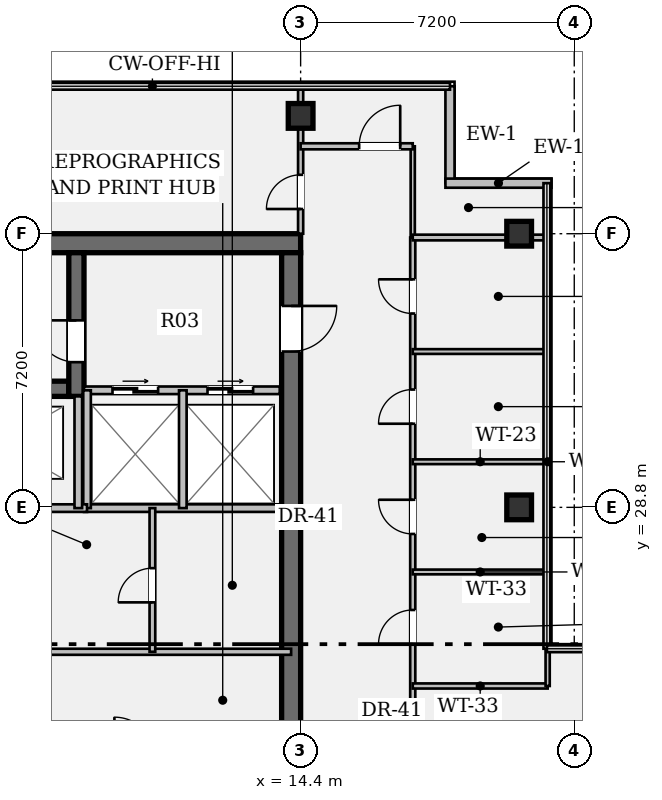
"""IFC4 building model, lengths in metres.
Left out: names, types, materials, properties, quantities, classifications, styles, units other than length and angle.
Written with IfcOpenShell. Run it as: python <this file> out.ifc"""

import sys

from ifc_helpers import new_model, si_unit, direction, frame, frame_2d, origin, origin_2d, place, context, subcontext, project, spatial, rectangle, hollow_rectangle, extrude, element, fill, save


model = new_model("IFC4")
c1 = context("Model", 3, precision=1e-05, world=origin(), true_north=direction((0.0, 1.0)))
c2 = subcontext(c1, "Body", "Model", "MODEL_VIEW")
j1 = project(units=[si_unit("LENGTHUNIT", "METRE"), si_unit("PLANEANGLEUNIT", "RADIAN")], contexts=[c1])
p1 = place(None, origin())
s1 = spatial("IfcSite", under=j1, at=p1, CompositionType="ELEMENT")
p2 = place(p1, origin())
s2 = spatial("IfcBuilding", under=s1, at=p2, CompositionType="ELEMENT")
p3 = place(p2, frame((0.0, 0.0, 251.65)))
s3 = spatial("IfcBuildingStorey", under=s2, at=p3, CompositionType="ELEMENT", Elevation=251.65)
p4 = place(p3, frame((0.5, 35.75, 0.0), z_axis=(0.0, 0.0, 1.0), x_axis=(1.0, 0.0, 0.0)))
e1 = element("IfcWall", 1, at=p4, inside=s3, PredefinedType="SHEAR", context=c2, shape_type="SweptSolid", body=[
    extrude(rectangle(XDim=13.9, YDim=0.5, at=frame_2d((6.95, 0.0))), origin(), (0.0, 0.0, 1.0), 3.24),
])
p5 = place(p3, frame((14.15, 35.5, 0.0), z_axis=(0.0, 0.0, 1.0), x_axis=(0.0, -1.0, 0.0)))
e2 = element("IfcWall", 2, at=p5, inside=s3, PredefinedType="SHEAR", context=c2, shape_type="SweptSolid", body=[
    extrude(rectangle(XDim=27.8, YDim=0.5, at=frame_2d((13.9, 0.0))), origin(), (0.0, 0.0, 1.0), 3.24),
])
p6 = place(p5, frame((1.4, 0.0, 0.0)))
e3 = element("IfcOpeningElement", 3, at=p6, cuts=e2, PredefinedType="OPENING", context=c2, shape_type="SweptSolid", body=[
    extrude(rectangle(XDim=1.2, YDim=2.15, at=frame_2d((0.6, 1.075))), frame((0.0, 0.262, 0.0), z_axis=(0.0, -1.0, 0.0), x_axis=(1.0, 0.0, 0.0)), (0.0, 0.0, 1.0), 0.524),
])
p7 = place(p5, frame((25.35, 0.0, 0.0)))
e4 = element("IfcOpeningElement", 4, at=p7, cuts=e2, PredefinedType="OPENING", context=c2, shape_type="SweptSolid", body=[
    extrude(rectangle(XDim=1.2, YDim=2.15, at=frame_2d((0.6, 1.075))), frame((0.0, 0.262, 0.0), z_axis=(0.0, -1.0, 0.0), x_axis=(1.0, 0.0, 0.0)), (0.0, 0.0, 1.0), 0.524),
])
p8 = place(p5, frame((14.7, 0.0, 0.0)))
e5 = element("IfcOpeningElement", 5, at=p8, cuts=e2, PredefinedType="OPENING", context=c2, shape_type="SweptSolid", body=[
    extrude(rectangle(XDim=1.6, YDim=2.2, at=frame_2d((0.8, 1.1))), frame((0.0, 0.262, 0.0), z_axis=(0.0, -1.0, 0.0), x_axis=(1.0, 0.0, 0.0)), (0.0, 0.0, 1.0), 0.524),
])
p9 = place(p3, frame((0.5, 31.92, 0.0), z_axis=(0.0, 0.0, 1.0), x_axis=(1.0, 0.0, 0.0)))
e6 = element("IfcWall", 6, at=p9, inside=s3, PredefinedType="SHEAR", context=c2, shape_type="SweptSolid", body=[
    extrude(rectangle(XDim=7.8, YDim=0.4, at=frame_2d((3.9, 0.0))), origin(), (0.0, 0.0, 1.0), 3.24),
])
p10 = place(p3, frame((8.5, 31.72, 0.0), z_axis=(0.0, 0.0, 1.0), x_axis=(0.0, 1.0, 0.0)))
e7 = element("IfcWall", 7, at=p10, inside=s3, PredefinedType="SHEAR", context=c2, shape_type="SweptSolid", body=[
    extrude(rectangle(XDim=3.78, YDim=0.4, at=frame_2d((1.89, 0.0))), origin(), (0.0, 0.0, 1.0), 3.24),
])
p11 = place(p10, frame((0.9, 0.0, 0.0)))
e8 = element("IfcOpeningElement", 8, at=p11, cuts=e7, PredefinedType="OPENING", context=c2, shape_type="SweptSolid", body=[
    extrude(rectangle(XDim=1.1, YDim=2.15, at=frame_2d((0.55, 1.075))), frame((0.0, 0.212, 0.0), z_axis=(0.0, -1.0, 0.0), x_axis=(1.0, 0.0, 0.0)), (0.0, 0.0, 1.0), 0.424),
])
for number, where, z_axis, x_axis in (
    (9, (14.4, 39.1, 0.0), (0.0, 0.0, 1.0), (1.0, 0.0, 0.0)),
    (10, (20.15, 28.8, 0.0), (0.0, 0.0, 1.0), (1.0, 0.0, 0.0)),
    (11, (20.15, 36.0, 0.0), (0.0, 0.0, 1.0), (1.0, 0.0, 0.0)),
):
    element("IfcColumn", number, at=place(p3, frame(where, z_axis=z_axis, x_axis=x_axis)), inside=s3, PredefinedType="COLUMN", context=c2, shape_type="SweptSolid", body=[
        extrude(hollow_rectangle(XDim=0.65, YDim=0.65, WallThickness=0.04, at=origin_2d()), origin(), (0.0, 0.0, 1.0), 3.24),
    ])
p12 = place(p3, frame((18.33, 39.88, 0.0), z_axis=(0.0, 0.0, 1.0), x_axis=(0.0, -1.0, 0.0)))
e12 = element("IfcWall", 12, at=p12, inside=s3, PredefinedType="STANDARD", context=c2, shape_type="SweptSolid", body=[
    extrude(rectangle(XDim=2.55, YDim=0.24, at=frame_2d((1.275, 0.0))), origin(), (0.0, 0.0, 1.0), 3.24),
])
p13 = place(p3, frame((18.21, 37.33, 0.0), z_axis=(0.0, 0.0, 1.0), x_axis=(1.0, 0.0, 0.0)))
e13 = element("IfcWall", 13, at=p13, inside=s3, PredefinedType="STANDARD", context=c2, shape_type="SweptSolid", body=[
    extrude(rectangle(XDim=2.79, YDim=0.24, at=frame_2d((1.395, 0.0))), origin(), (0.0, 0.0, 1.0), 3.24),
])
p14 = place(p3, frame((8.7, 31.88, 0.0), z_axis=(0.0, 0.0, 1.0), x_axis=(1.0, 0.0, 0.0)))
e14 = element("IfcWall", 14, at=p14, inside=s3, PredefinedType="PARTITIONING", context=c2, shape_type="SweptSolid", body=[
    extrude(rectangle(XDim=5.15, YDim=0.2, at=frame_2d((2.575, 0.0))), origin(), (0.0, 0.0, 1.0), 3.24),
])
p15 = place(p14, frame((0.75, 0.0, 0.0)))
e15 = element("IfcOpeningElement", 15, at=p15, cuts=e14, PredefinedType="OPENING", context=c2, shape_type="SweptSolid", body=[
    extrude(rectangle(XDim=1.2, YDim=2.2, at=frame_2d((0.6, 1.1))), frame((0.0, 0.112, 0.0), z_axis=(0.0, -1.0, 0.0), x_axis=(1.0, 0.0, 0.0)), (0.0, 0.0, 1.0), 0.224),
])
p16 = place(p14, frame((3.25, 0.0, 0.0)))
e16 = element("IfcOpeningElement", 16, at=p16, cuts=e14, PredefinedType="OPENING", context=c2, shape_type="SweptSolid", body=[
    extrude(rectangle(XDim=1.2, YDim=2.2, at=frame_2d((0.6, 1.1))), frame((0.0, 0.112, 0.0), z_axis=(0.0, -1.0, 0.0), x_axis=(1.0, 0.0, 0.0)), (0.0, 0.0, 1.0), 0.224),
])
p17 = place(p3, frame((8.7, 28.78, 0.0), z_axis=(0.0, 0.0, 1.0), x_axis=(1.0, 0.0, 0.0)))
e17 = element("IfcWall", 17, at=p17, inside=s3, PredefinedType="PARTITIONING", context=c2, shape_type="SweptSolid", body=[
    extrude(rectangle(XDim=5.15, YDim=0.2, at=frame_2d((2.575, 0.0))), origin(), (0.0, 0.0, 1.0), 3.24),
])
for number, where, z_axis, x_axis in (
    (18, (8.78, 28.78, 0.0), (0.0, 0.0, 1.0), (0.0, 1.0, 0.0)),
    (19, (11.3, 28.78, 0.0), (0.0, 0.0, 1.0), (0.0, 1.0, 0.0)),
):
    element("IfcWall", number, at=place(p3, frame(where, z_axis=z_axis, x_axis=x_axis)), inside=s3, PredefinedType="PARTITIONING", context=c2, shape_type="SweptSolid", body=[
        extrude(rectangle(XDim=3.1, YDim=0.2, at=frame_2d((1.55, 0.0))), origin(), (0.0, 0.0, 1.0), 3.24),
    ])
p18 = place(p3, frame((0.6, 28.78, 0.0), z_axis=(0.0, 0.0, 1.0), x_axis=(1.0, 0.0, 0.0)))
e20 = element("IfcWall", 20, at=p18, inside=s3, PredefinedType="PARTITIONING", context=c2, shape_type="SweptSolid", body=[
    extrude(rectangle(XDim=8.18, YDim=0.2, at=frame_2d((4.09, 0.0))), origin(), (0.0, 0.0, 1.0), 3.24),
])
p19 = place(p18, frame((1.21, 0.0, 0.0)))
e21 = element("IfcOpeningElement", 21, at=p19, cuts=e20, PredefinedType="OPENING", context=c2, shape_type="SweptSolid", body=[
    extrude(rectangle(XDim=0.95, YDim=2.15, at=frame_2d((0.475, 1.075))), frame((0.0, 0.112, 0.0), z_axis=(0.0, -1.0, 0.0), x_axis=(1.0, 0.0, 0.0)), (0.0, 0.0, 1.0), 0.224),
])
p20 = place(p18, frame((5.03, 0.0, 0.0)))
e22 = element("IfcOpeningElement", 22, at=p20, cuts=e20, PredefinedType="OPENING", context=c2, shape_type="SweptSolid", body=[
    extrude(rectangle(XDim=0.95, YDim=2.15, at=frame_2d((0.475, 1.075))), frame((0.0, 0.112, 0.0), z_axis=(0.0, -1.0, 0.0), x_axis=(1.0, 0.0, 0.0)), (0.0, 0.0, 1.0), 0.224),
])
p21 = place(p3, frame((8.55, 28.78, 0.0), z_axis=(0.0, 0.0, 1.0), x_axis=(0.0, 1.0, 0.0)))
e23 = element("IfcWall", 23, at=p21, inside=s3, PredefinedType="PARTITIONING", context=c2, shape_type="SweptSolid", body=[
    extrude(rectangle(XDim=2.94, YDim=0.2, at=frame_2d((1.47, 0.0))), origin(), (0.0, 0.0, 1.0), 3.24),
])
p22 = place(p3, frame((7.1, 25.0, 0.0), z_axis=(0.0, 0.0, 1.0), x_axis=(1.0, 0.0, 0.0)))
e24 = element("IfcWall", 24, at=p22, inside=s3, PredefinedType="PARTITIONING", context=c2, shape_type="SweptSolid", body=[
    extrude(rectangle(XDim=7.05, YDim=0.16, at=frame_2d((3.525, 0.0))), origin(), (0.0, 0.0, 1.0), 3.24),
])
p23 = place(p3, frame((10.5, 25.0, 0.0), z_axis=(0.0, 0.0, 1.0), x_axis=(0.0, 1.0, 0.0)))
e25 = element("IfcWall", 25, at=p23, inside=s3, PredefinedType="PARTITIONING", context=c2, shape_type="SweptSolid", body=[
    extrude(rectangle(XDim=3.78, YDim=0.15, at=frame_2d((1.89, 0.0))), origin(), (0.0, 0.0, 1.0), 3.24),
])
p24 = place(p23, frame((1.3, 0.0, 0.0)))
e26 = element("IfcOpeningElement", 26, at=p24, cuts=e25, PredefinedType="OPENING", context=c2, shape_type="SweptSolid", body=[
    extrude(rectangle(XDim=0.9, YDim=2.15, at=frame_2d((0.45, 1.075))), frame((0.0, 0.087, 0.0), z_axis=(0.0, -1.0, 0.0), x_axis=(1.0, 0.0, 0.0)), (0.0, 0.0, 1.0), 0.174),
])
p25 = place(p3, frame((17.35, 17.35, 0.0), z_axis=(0.0, 0.0, 1.0), x_axis=(0.0, 1.0, 0.0)))
e27 = element("IfcWall", 27, at=p25, inside=s3, PredefinedType="PARTITIONING", context=c2, shape_type="SweptSolid", body=[
    extrude(rectangle(XDim=18.55, YDim=0.135, at=frame_2d((9.275, 0.0))), origin(), (0.0, 0.0, 1.0), 2.676),
])
p26 = place(p25, frame((7.85, 0.0, 0.0)))
e28 = element("IfcOpeningElement", 28, at=p26, cuts=e27, PredefinedType="OPENING", context=c2, shape_type="SweptSolid", body=[
    extrude(rectangle(XDim=0.9, YDim=2.15, at=frame_2d((0.45, 1.075))), frame((0.0, 0.08, 0.0), z_axis=(0.0, -1.0, 0.0), x_axis=(1.0, 0.0, 0.0)), (0.0, 0.0, 1.0), 0.159),
])
p27 = place(p25, frame((10.75, 0.0, 0.0)))
e29 = element("IfcOpeningElement", 29, at=p27, cuts=e27, PredefinedType="OPENING", context=c2, shape_type="SweptSolid", body=[
    extrude(rectangle(XDim=0.9, YDim=2.15, at=frame_2d((0.45, 1.075))), frame((0.0, 0.08, 0.0), z_axis=(0.0, -1.0, 0.0), x_axis=(1.0, 0.0, 0.0)), (0.0, 0.0, 1.0), 0.159),
])
p28 = place(p25, frame((13.65, 0.0, 0.0)))
e30 = element("IfcOpeningElement", 30, at=p28, cuts=e27, PredefinedType="OPENING", context=c2, shape_type="SweptSolid", body=[
    extrude(rectangle(XDim=0.9, YDim=2.15, at=frame_2d((0.45, 1.075))), frame((0.0, 0.08, 0.0), z_axis=(0.0, -1.0, 0.0), x_axis=(1.0, 0.0, 0.0)), (0.0, 0.0, 1.0), 0.159),
])
p29 = place(p25, frame((16.55, 0.0, 0.0)))
e31 = element("IfcOpeningElement", 31, at=p29, cuts=e27, PredefinedType="OPENING", context=c2, shape_type="SweptSolid", body=[
    extrude(rectangle(XDim=0.9, YDim=2.15, at=frame_2d((0.45, 1.075))), frame((0.0, 0.08, 0.0), z_axis=(0.0, -1.0, 0.0), x_axis=(1.0, 0.0, 0.0)), (0.0, 0.0, 1.0), 0.159),
])
p30 = place(p3, frame((14.4, 36.0, 0.0), z_axis=(0.0, 0.0, 1.0), x_axis=(0.0, 1.0, 0.0)))
e32 = element("IfcWall", 32, at=p30, inside=s3, PredefinedType="PARTITIONING", context=c2, shape_type="SweptSolid", body=[
    extrude(rectangle(XDim=3.88, YDim=0.135, at=frame_2d((1.94, 0.0))), origin(), (0.0, 0.0, 1.0), 2.676),
])
p31 = place(p30, frame((0.65, 0.0, 0.0)))
e33 = element("IfcOpeningElement", 33, at=p31, cuts=e32, PredefinedType="OPENING", context=c2, shape_type="SweptSolid", body=[
    extrude(rectangle(XDim=0.9, YDim=2.15, at=frame_2d((0.45, 1.075))), frame((0.0, 0.08, 0.0), z_axis=(0.0, -1.0, 0.0), x_axis=(1.0, 0.0, 0.0)), (0.0, 0.0, 1.0), 0.159),
])
p32 = place(p3, frame((17.35, 35.9, 0.0), z_axis=(0.0, 0.0, 1.0), x_axis=(0.0, 1.0, 0.0)))
e34 = element("IfcWall", 34, at=p32, inside=s3, PredefinedType="PARTITIONING", context=c2, shape_type="SweptSolid", body=[
    extrude(rectangle(XDim=2.4, YDim=0.11, at=frame_2d((1.2, 0.0))), origin(), (0.0, 0.0, 1.0), 2.676),
])
p33 = place(p3, frame((14.4, 38.3, 0.0), z_axis=(0.0, 0.0, 1.0), x_axis=(1.0, 0.0, 0.0)))
e35 = element("IfcWall", 35, at=p33, inside=s3, PredefinedType="PARTITIONING", context=c2, shape_type="SweptSolid", body=[
    extrude(rectangle(XDim=2.95, YDim=0.16, at=frame_2d((1.475, 0.0))), origin(), (0.0, 0.0, 1.0), 3.24),
])
p34 = place(p33, frame((1.54, 0.0, 0.0)))
e36 = element("IfcOpeningElement", 36, at=p34, cuts=e35, PredefinedType="OPENING", context=c2, shape_type="SweptSolid", body=[
    extrude(rectangle(XDim=1.08, YDim=2.15, at=frame_2d((0.54, 1.075))), frame((0.0, 0.092, 0.0), z_axis=(0.0, -1.0, 0.0), x_axis=(1.0, 0.0, 0.0)), (0.0, 0.0, 1.0), 0.184),
])
p35 = place(p3, frame((17.35, 35.9, 0.0), z_axis=(0.0, 0.0, 1.0), x_axis=(1.0, 0.0, 0.0)))
e37 = element("IfcWall", 37, at=p35, inside=s3, PredefinedType="PARTITIONING", context=c2, shape_type="SweptSolid", body=[
    extrude(rectangle(XDim=3.53, YDim=0.15, at=frame_2d((1.765, 0.0))), origin(), (0.0, 0.0, 1.0), 2.676),
])
p36 = place(p3, frame((17.35, 24.1, 0.0), z_axis=(0.0, 0.0, 1.0), x_axis=(1.0, 0.0, 0.0)))
e38 = element("IfcWall", 38, at=p36, inside=s3, PredefinedType="PARTITIONING", context=c2, shape_type="SweptSolid", body=[
    extrude(rectangle(XDim=3.55, YDim=0.135, at=frame_2d((1.775, 0.0))), origin(), (0.0, 0.0, 1.0), 2.808),
])
p37 = place(p3, frame((20.9, 24.1, 0.0), z_axis=(0.0, 0.0, 1.0), x_axis=(0.0, 1.0, 0.0)))
e39 = element("IfcWall", 39, at=p37, inside=s3, PredefinedType="PARTITIONING", context=c2, shape_type="SweptSolid", body=[
    extrude(rectangle(XDim=11.8, YDim=0.11, at=frame_2d((5.9, 0.0))), origin(), (0.0, 0.0, 1.0), 3.24),
])
for number, where, z_axis, x_axis in (
    (40, (17.35, 27.1, 0.0), (0.0, 0.0, 1.0), (1.0, 0.0, 0.0)),
    (41, (17.35, 30.0, 0.0), (0.0, 0.0, 1.0), (1.0, 0.0, 0.0)),
    (42, (17.35, 32.9, 0.0), (0.0, 0.0, 1.0), (1.0, 0.0, 0.0)),
):
    element("IfcWall", number, at=place(p3, frame(where, z_axis=z_axis, x_axis=x_axis)), inside=s3, PredefinedType="PARTITIONING", context=c2, shape_type="SweptSolid", body=[
        extrude(rectangle(XDim=3.55, YDim=0.125, at=frame_2d((1.775, 0.0))), origin(), (0.0, 0.0, 1.0), 2.808),
    ])
p38 = place(p11, origin())
e43 = element("IfcDoor", 43, at=p38, inside=s3, OperationType="SINGLE_SWING_RIGHT", PredefinedType="DOOR", context=c2, shape_type="SweptSolid", body=[
    extrude(rectangle(XDim=1.1, YDim=2.15, at=frame_2d((0.55, 1.075))), frame((0.0, 0.025, 0.0), z_axis=(0.0, -1.0, 0.0), x_axis=(1.0, 0.0, 0.0)), (0.0, 0.0, 1.0), 0.05),
])
fill(e8, e43)
p39 = place(p6, origin())
e44 = element("IfcDoor", 44, at=p39, inside=s3, OperationType="SINGLE_SWING_LEFT", PredefinedType="DOOR", context=c2, shape_type="SweptSolid", body=[
    extrude(rectangle(XDim=1.2, YDim=2.15, at=frame_2d((0.6, 1.075))), frame((0.0, 0.025, 0.0), z_axis=(0.0, -1.0, 0.0), x_axis=(1.0, 0.0, 0.0)), (0.0, 0.0, 1.0), 0.05),
])
fill(e3, e44)
p40 = place(p15, origin())
e45 = element("IfcDoor", 45, at=p40, inside=s3, OperationType="DOUBLE_DOOR_SLIDING", PredefinedType="DOOR", context=c2, shape_type="SweptSolid", body=[
    extrude(rectangle(XDim=1.2, YDim=2.2, at=frame_2d((0.6, 1.1))), frame((0.0, 0.025, 0.0), z_axis=(0.0, -1.0, 0.0), x_axis=(1.0, 0.0, 0.0)), (0.0, 0.0, 1.0), 0.05),
])
fill(e15, e45)
p41 = place(p16, origin())
e46 = element("IfcDoor", 46, at=p41, inside=s3, OperationType="DOUBLE_DOOR_SLIDING", PredefinedType="DOOR", context=c2, shape_type="SweptSolid", body=[
    extrude(rectangle(XDim=1.2, YDim=2.2, at=frame_2d((0.6, 1.1))), frame((0.0, 0.025, 0.0), z_axis=(0.0, -1.0, 0.0), x_axis=(1.0, 0.0, 0.0)), (0.0, 0.0, 1.0), 0.05),
])
fill(e16, e46)
p42 = place(p24, origin())
e47 = element("IfcDoor", 47, at=p42, inside=s3, OperationType="SINGLE_SWING_LEFT", PredefinedType="DOOR", context=c2, shape_type="SweptSolid", body=[
    extrude(rectangle(XDim=0.9, YDim=2.15, at=frame_2d((0.45, 1.075))), frame((0.0, 0.025, 0.0), z_axis=(0.0, -1.0, 0.0), x_axis=(1.0, 0.0, 0.0)), (0.0, 0.0, 1.0), 0.05),
])
fill(e26, e47)
p43 = place(p31, origin())
e48 = element("IfcDoor", 48, at=p43, inside=s3, OperationType="SINGLE_SWING_LEFT", PredefinedType="DOOR", context=c2, shape_type="SweptSolid", body=[
    extrude(rectangle(XDim=0.9, YDim=2.15, at=frame_2d((0.45, 1.075))), frame((0.0, 0.025, 0.0), z_axis=(0.0, -1.0, 0.0), x_axis=(1.0, 0.0, 0.0)), (0.0, 0.0, 1.0), 0.05),
])
fill(e33, e48)
p44 = place(p34, origin())
e49 = element("IfcDoor", 49, at=p44, inside=s3, OperationType="SINGLE_SWING_RIGHT", PredefinedType="DOOR", context=c2, shape_type="SweptSolid", body=[
    extrude(rectangle(XDim=1.08, YDim=2.15, at=frame_2d((0.54, 1.075))), frame((0.0, 0.025, 0.0), z_axis=(0.0, -1.0, 0.0), x_axis=(1.0, 0.0, 0.0)), (0.0, 0.0, 1.0), 0.05),
])
fill(e36, e49)
p45 = place(p26, origin())
e50 = element("IfcDoor", 50, at=p45, inside=s3, OperationType="SINGLE_SWING_LEFT", PredefinedType="DOOR", context=c2, shape_type="SweptSolid", body=[
    extrude(rectangle(XDim=0.9, YDim=2.15, at=frame_2d((0.45, 1.075))), frame((0.0, 0.025, 0.0), z_axis=(0.0, -1.0, 0.0), x_axis=(1.0, 0.0, 0.0)), (0.0, 0.0, 1.0), 0.05),
])
fill(e28, e50)
p46 = place(p27, origin())
e51 = element("IfcDoor", 51, at=p46, inside=s3, OperationType="SINGLE_SWING_RIGHT", PredefinedType="DOOR", context=c2, shape_type="SweptSolid", body=[
    extrude(rectangle(XDim=0.9, YDim=2.15, at=frame_2d((0.45, 1.075))), frame((0.0, 0.025, 0.0), z_axis=(0.0, -1.0, 0.0), x_axis=(1.0, 0.0, 0.0)), (0.0, 0.0, 1.0), 0.05),
])
fill(e29, e51)
p47 = place(p28, origin())
e52 = element("IfcDoor", 52, at=p47, inside=s3, OperationType="SINGLE_SWING_LEFT", PredefinedType="DOOR", context=c2, shape_type="SweptSolid", body=[
    extrude(rectangle(XDim=0.9, YDim=2.15, at=frame_2d((0.45, 1.075))), frame((0.0, 0.025, 0.0), z_axis=(0.0, -1.0, 0.0), x_axis=(1.0, 0.0, 0.0)), (0.0, 0.0, 1.0), 0.05),
])
fill(e30, e52)
p48 = place(p29, origin())
e53 = element("IfcDoor", 53, at=p48, inside=s3, OperationType="SINGLE_SWING_RIGHT", PredefinedType="DOOR", context=c2, shape_type="SweptSolid", body=[
    extrude(rectangle(XDim=0.9, YDim=2.15, at=frame_2d((0.45, 1.075))), frame((0.0, 0.025, 0.0), z_axis=(0.0, -1.0, 0.0), x_axis=(1.0, 0.0, 0.0)), (0.0, 0.0, 1.0), 0.05),
])
fill(e31, e53)
save(model, sys.argv[1])
